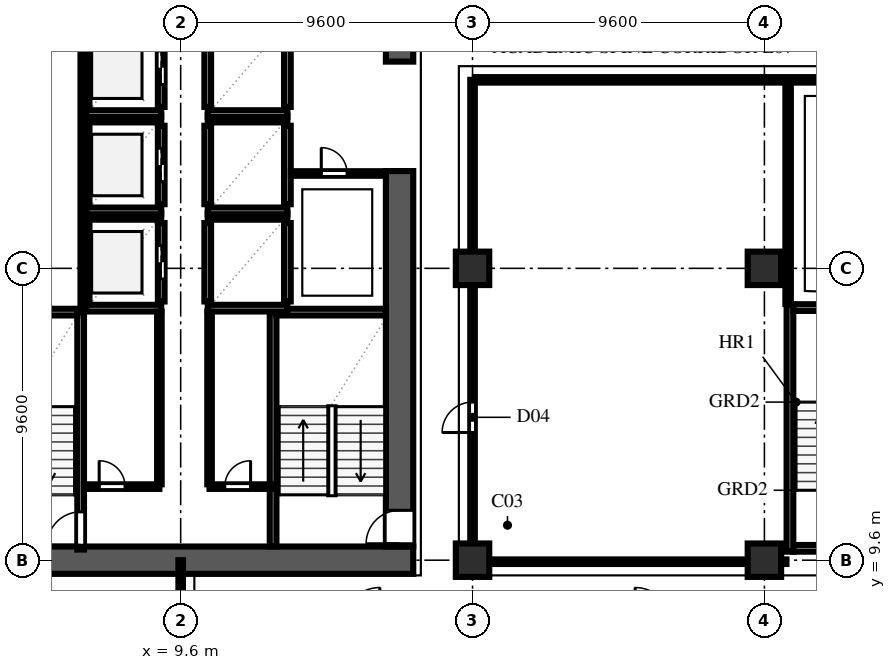
"""IFC4 building model, lengths in metres.
Left out: names, types, materials, properties, quantities, classifications, styles, units other than length and angle.
Written with IfcOpenShell. Run it as: python <this file> out.ifc"""

import sys

from ifc_helpers import new_model, si_unit, direction, frame, frame_2d, origin, origin_2d, place, context, subcontext, project, spatial, rectangle, extrude, element, fill, save


model = new_model("IFC4")
c1 = context("Model", 3, precision=1e-05, world=origin(), true_north=direction((0.0, 1.0)))
c2 = subcontext(c1, "Body", "Model", "MODEL_VIEW")
j1 = project(units=[si_unit("LENGTHUNIT", "METRE"), si_unit("PLANEANGLEUNIT", "RADIAN")], contexts=[c1])
p1 = place(None, origin())
s1 = spatial("IfcSite", under=j1, at=p1, CompositionType="ELEMENT")
p2 = place(p1, origin())
s2 = spatial("IfcBuilding", under=s1, at=p2, CompositionType="ELEMENT")
p3 = place(p2, frame((0.0, 0.0, 31.8)))
s3 = spatial("IfcBuildingStorey", under=s2, at=p3, CompositionType="ELEMENT", Elevation=31.8)
p4 = place(p3, frame((2.65, 9.6, 0.0), z_axis=(0.0, 0.0, 1.0), x_axis=(1.0, 0.0, 0.0)))
e1 = element("IfcWall", 1, at=p4, inside=s3, PredefinedType="SHEAR", context=c2, shape_type="SweptSolid", body=[
    extrude(rectangle(XDim=14.6, YDim=0.9, at=frame_2d((7.3, 0.0))), origin(), (0.0, 0.0, 1.0), 3.54),
])
p5 = place(p3, frame((16.8, 10.05, 0.0), z_axis=(0.0, 0.0, 1.0), x_axis=(0.0, 1.0, 0.0)))
e2 = element("IfcWall", 2, at=p5, inside=s3, PredefinedType="SHEAR", context=c2, shape_type="SweptSolid", body=[
    extrude(rectangle(XDim=12.35, YDim=0.9, at=frame_2d((6.175, 0.0))), origin(), (0.0, 0.0, 1.0), 3.54),
])
p6 = place(p5, frame((0.09, 0.0, 0.0)))
e3 = element("IfcOpeningElement", 3, at=p6, cuts=e2, PredefinedType="OPENING", context=c2, shape_type="SweptSolid", body=[
    extrude(rectangle(XDim=1.1, YDim=2.2, at=frame_2d((0.55, 1.1))), frame((0.0, 0.462, 0.0), z_axis=(0.0, -1.0, 0.0), x_axis=(1.0, 0.0, 0.0)), (0.0, 0.0, 1.0), 0.924),
])
p7 = place(p3, frame((16.8, 26.0, 0.0), z_axis=(0.0, 0.0, 1.0), x_axis=(0.0, 1.0, 0.0)))
e4 = element("IfcWall", 4, at=p7, inside=s3, PredefinedType="SHEAR", context=c2, shape_type="SweptSolid", body=[
    extrude(rectangle(XDim=7.8, YDim=0.9, at=frame_2d((3.9, 0.0))), origin(), (0.0, 0.0, 1.0), 3.54),
])
for number, where, z_axis, x_axis in (
    (5, (19.2, 9.6, 0.0), (0.0, 0.0, 1.0), (1.0, 0.0, 0.0)),
    (6, (19.2, 19.2, 0.0), (0.0, 0.0, 1.0), (1.0, 0.0, 0.0)),
    (7, (28.8, 9.6, 0.0), (0.0, 0.0, 1.0), (1.0, 0.0, 0.0)),
    (8, (28.8, 19.2, 0.0), (0.0, 0.0, 1.0), (1.0, 0.0, 0.0)),
):
    element("IfcColumn", number, at=place(p3, frame(where, z_axis=z_axis, x_axis=x_axis)), inside=s3, PredefinedType="COLUMN", context=c2, shape_type="SweptSolid", body=[
        extrude(rectangle(XDim=1.1, YDim=1.1, at=origin_2d()), origin(), (0.0, 0.0, 1.0), 3.8),
    ])
p8 = place(p3, frame((6.31, 9.95, 0.0), z_axis=(0.0, 0.0, 1.0), x_axis=(0.0, 1.0, 0.0)))
e9 = element("IfcWall", 9, at=p8, inside=s3, PredefinedType="SOLIDWALL", context=c2, shape_type="SweptSolid", body=[
    extrude(rectangle(XDim=7.81, YDim=0.22, at=frame_2d((3.905, 0.0))), origin(), (0.0, 0.0, 1.0), 3.54),
])
p9 = place(p8, frame((0.14, 0.0, 0.0)))
e10 = element("IfcOpeningElement", 10, at=p9, cuts=e9, PredefinedType="OPENING", context=c2, shape_type="SweptSolid", body=[
    extrude(rectangle(XDim=1.1, YDim=2.2, at=frame_2d((0.55, 1.1))), frame((0.0, 0.122, 0.0), z_axis=(0.0, -1.0, 0.0), x_axis=(1.0, 0.0, 0.0)), (0.0, 0.0, 1.0), 0.244),
])
p10 = place(p3, frame((2.65, 17.76, 0.0), z_axis=(0.0, 0.0, 1.0), x_axis=(1.0, 0.0, 0.0)))
e11 = element("IfcWall", 11, at=p10, inside=s3, PredefinedType="SOLIDWALL", context=c2, shape_type="SweptSolid", body=[
    extrude(rectangle(XDim=3.55, YDim=0.22, at=frame_2d((1.775, 0.0))), origin(), (0.0, 0.0, 1.0), 3.54),
])
p11 = place(p3, frame((12.64, 10.05, 0.0), z_axis=(0.0, 0.0, 1.0), x_axis=(0.0, 1.0, 0.0)))
e12 = element("IfcWall", 12, at=p11, inside=s3, PredefinedType="SOLIDWALL", context=c2, shape_type="SweptSolid", body=[
    extrude(rectangle(XDim=7.71, YDim=0.22, at=frame_2d((3.855, 0.0))), origin(), (0.0, 0.0, 1.0), 3.54),
])
p12 = place(p3, frame((12.75, 17.76, 0.0), z_axis=(0.0, 0.0, 1.0), x_axis=(1.0, 0.0, 0.0)))
e13 = element("IfcWall", 13, at=p12, inside=s3, PredefinedType="SOLIDWALL", context=c2, shape_type="SweptSolid", body=[
    extrude(rectangle(XDim=3.6, YDim=0.22, at=frame_2d((1.8, 0.0))), origin(), (0.0, 0.0, 1.0), 3.54),
])
p13 = place(p3, frame((29.75, 9.99, 0.0), z_axis=(0.0, 0.0, 1.0), x_axis=(1.0, 0.0, 0.0)))
e14 = element("IfcWall", 14, at=p13, inside=s3, PredefinedType="SOLIDWALL", context=c2, shape_type="SweptSolid", body=[
    extrude(rectangle(XDim=3.65, YDim=0.22, at=frame_2d((1.825, 0.0))), origin(), (0.0, 0.0, 1.0), 3.54),
])
p14 = place(p13, frame((1.24, 0.0, 0.0)))
e15 = element("IfcOpeningElement", 15, at=p14, cuts=e14, PredefinedType="OPENING", context=c2, shape_type="SweptSolid", body=[
    extrude(rectangle(XDim=1.1, YDim=2.2, at=frame_2d((0.55, 1.1))), frame((0.0, 0.122, 0.0), z_axis=(0.0, -1.0, 0.0), x_axis=(1.0, 0.0, 0.0)), (0.0, 0.0, 1.0), 0.244),
])
p15 = place(p3, frame((29.64, 9.88, 0.0), z_axis=(0.0, 0.0, 1.0), x_axis=(0.0, 1.0, 0.0)))
e16 = element("IfcWall", 16, at=p15, inside=s3, PredefinedType="SOLIDWALL", context=c2, shape_type="SweptSolid", body=[
    extrude(rectangle(XDim=8.14, YDim=0.22, at=frame_2d((4.07, 0.0))), origin(), (0.0, 0.0, 1.0), 3.54),
])
p16 = place(p3, frame((29.75, 17.91, 0.0), z_axis=(0.0, 0.0, 1.0), x_axis=(1.0, 0.0, 0.0)))
e17 = element("IfcWall", 17, at=p16, inside=s3, PredefinedType="SOLIDWALL", context=c2, shape_type="SweptSolid", body=[
    extrude(rectangle(XDim=3.65, YDim=0.22, at=frame_2d((1.825, 0.0))), origin(), (0.0, 0.0, 1.0), 3.54),
])
p17 = place(p3, frame((6.49, 18.11, 0.0), z_axis=(0.0, 0.0, 1.0), x_axis=(0.0, 1.0, 0.0)))
e18 = element("IfcWall", 18, at=p17, inside=s3, PredefinedType="SOLIDWALL", context=c2, shape_type="SweptSolid", body=[
    extrude(rectangle(XDim=2.58, YDim=0.22, at=frame_2d((1.29, 0.0))), origin(), (0.0, 0.0, 1.0), 3.54),
])
p18 = place(p3, frame((8.96, 18.11, 0.0), z_axis=(0.0, 0.0, 1.0), x_axis=(0.0, 1.0, 0.0)))
e19 = element("IfcWall", 19, at=p18, inside=s3, PredefinedType="SOLIDWALL", context=c2, shape_type="SweptSolid", body=[
    extrude(rectangle(XDim=2.58, YDim=0.22, at=frame_2d((1.29, 0.0))), origin(), (0.0, 0.0, 1.0), 3.54),
])
p19 = place(p18, frame((0.74, 0.0, 0.0)))
e20 = element("IfcOpeningElement", 20, at=p19, cuts=e19, PredefinedType="OPENING", context=c2, shape_type="SweptSolid", body=[
    extrude(rectangle(XDim=1.1, YDim=2.2, at=frame_2d((0.55, 1.1))), frame((0.0, 0.122, 0.0), z_axis=(0.0, -1.0, 0.0), x_axis=(1.0, 0.0, 0.0)), (0.0, 0.0, 1.0), 0.244),
])
for number, where, z_axis, x_axis in (
    (21, (6.49, 17.89, 0.0), (0.0, 0.0, 1.0), (1.0, 0.0, 0.0)),
    (22, (6.49, 20.91, 0.0), (0.0, 0.0, 1.0), (1.0, 0.0, 0.0)),
):
    element("IfcWall", number, at=place(p3, frame(where, z_axis=z_axis, x_axis=x_axis)), inside=s3, PredefinedType="SOLIDWALL", context=c2, shape_type="SweptSolid", body=[
        extrude(rectangle(XDim=2.47, YDim=0.22, at=frame_2d((1.235, 0.0))), origin(), (0.0, 0.0, 1.0), 3.54),
    ])
p20 = place(p3, frame((6.49, 21.31, 0.0), z_axis=(0.0, 0.0, 1.0), x_axis=(0.0, 1.0, 0.0)))
e23 = element("IfcWall", 23, at=p20, inside=s3, PredefinedType="SOLIDWALL", context=c2, shape_type="SweptSolid", body=[
    extrude(rectangle(XDim=2.58, YDim=0.22, at=frame_2d((1.29, 0.0))), origin(), (0.0, 0.0, 1.0), 3.54),
])
p21 = place(p3, frame((8.96, 21.31, 0.0), z_axis=(0.0, 0.0, 1.0), x_axis=(0.0, 1.0, 0.0)))
e24 = element("IfcWall", 24, at=p21, inside=s3, PredefinedType="SOLIDWALL", context=c2, shape_type="SweptSolid", body=[
    extrude(rectangle(XDim=2.58, YDim=0.22, at=frame_2d((1.29, 0.0))), origin(), (0.0, 0.0, 1.0), 3.54),
])
p22 = place(p21, frame((0.74, 0.0, 0.0)))
e25 = element("IfcOpeningElement", 25, at=p22, cuts=e24, PredefinedType="OPENING", context=c2, shape_type="SweptSolid", body=[
    extrude(rectangle(XDim=1.1, YDim=2.2, at=frame_2d((0.55, 1.1))), frame((0.0, 0.122, 0.0), z_axis=(0.0, -1.0, 0.0), x_axis=(1.0, 0.0, 0.0)), (0.0, 0.0, 1.0), 0.244),
])
for number, where, z_axis, x_axis in (
    (26, (6.49, 21.09, 0.0), (0.0, 0.0, 1.0), (1.0, 0.0, 0.0)),
    (27, (6.49, 24.11, 0.0), (0.0, 0.0, 1.0), (1.0, 0.0, 0.0)),
):
    element("IfcWall", number, at=place(p3, frame(where, z_axis=z_axis, x_axis=x_axis)), inside=s3, PredefinedType="SOLIDWALL", context=c2, shape_type="SweptSolid", body=[
        extrude(rectangle(XDim=2.47, YDim=0.22, at=frame_2d((1.235, 0.0))), origin(), (0.0, 0.0, 1.0), 3.54),
    ])
p23 = place(p3, frame((6.49, 24.51, 0.0), z_axis=(0.0, 0.0, 1.0), x_axis=(0.0, 1.0, 0.0)))
e28 = element("IfcWall", 28, at=p23, inside=s3, PredefinedType="SOLIDWALL", context=c2, shape_type="SweptSolid", body=[
    extrude(rectangle(XDim=2.58, YDim=0.22, at=frame_2d((1.29, 0.0))), origin(), (0.0, 0.0, 1.0), 3.54),
])
p24 = place(p3, frame((8.96, 24.51, 0.0), z_axis=(0.0, 0.0, 1.0), x_axis=(0.0, 1.0, 0.0)))
e29 = element("IfcWall", 29, at=p24, inside=s3, PredefinedType="SOLIDWALL", context=c2, shape_type="SweptSolid", body=[
    extrude(rectangle(XDim=2.58, YDim=0.22, at=frame_2d((1.29, 0.0))), origin(), (0.0, 0.0, 1.0), 3.54),
])
p25 = place(p24, frame((0.74, 0.0, 0.0)))
e30 = element("IfcOpeningElement", 30, at=p25, cuts=e29, PredefinedType="OPENING", context=c2, shape_type="SweptSolid", body=[
    extrude(rectangle(XDim=1.1, YDim=2.2, at=frame_2d((0.55, 1.1))), frame((0.0, 0.122, 0.0), z_axis=(0.0, -1.0, 0.0), x_axis=(1.0, 0.0, 0.0)), (0.0, 0.0, 1.0), 0.244),
])
p26 = place(p3, frame((6.49, 24.29, 0.0), z_axis=(0.0, 0.0, 1.0), x_axis=(1.0, 0.0, 0.0)))
e31 = element("IfcWall", 31, at=p26, inside=s3, PredefinedType="SOLIDWALL", context=c2, shape_type="SweptSolid", body=[
    extrude(rectangle(XDim=2.47, YDim=0.22, at=frame_2d((1.235, 0.0))), origin(), (0.0, 0.0, 1.0), 3.54),
])
for number, where, z_axis, x_axis in (
    (32, (10.49, 18.11, 0.0), (0.0, 0.0, 1.0), (0.0, 1.0, 0.0)),
    (33, (13.11, 18.11, 0.0), (0.0, 0.0, 1.0), (0.0, 1.0, 0.0)),
):
    element("IfcWall", number, at=place(p3, frame(where, z_axis=z_axis, x_axis=x_axis)), inside=s3, PredefinedType="SOLIDWALL", context=c2, shape_type="SweptSolid", body=[
        extrude(rectangle(XDim=2.58, YDim=0.22, at=frame_2d((1.29, 0.0))), origin(), (0.0, 0.0, 1.0), 3.54),
    ])
for number, where, z_axis, x_axis in (
    (34, (10.49, 17.89, 0.0), (0.0, 0.0, 1.0), (1.0, 0.0, 0.0)),
    (35, (10.49, 20.91, 0.0), (0.0, 0.0, 1.0), (1.0, 0.0, 0.0)),
):
    element("IfcWall", number, at=place(p3, frame(where, z_axis=z_axis, x_axis=x_axis)), inside=s3, PredefinedType="SOLIDWALL", context=c2, shape_type="SweptSolid", body=[
        extrude(rectangle(XDim=2.62, YDim=0.22, at=frame_2d((1.31, 0.0))), origin(), (0.0, 0.0, 1.0), 3.54),
    ])
for number, where, z_axis, x_axis in (
    (36, (10.49, 21.31, 0.0), (0.0, 0.0, 1.0), (0.0, 1.0, 0.0)),
    (37, (13.11, 21.31, 0.0), (0.0, 0.0, 1.0), (0.0, 1.0, 0.0)),
):
    element("IfcWall", number, at=place(p3, frame(where, z_axis=z_axis, x_axis=x_axis)), inside=s3, PredefinedType="SOLIDWALL", context=c2, shape_type="SweptSolid", body=[
        extrude(rectangle(XDim=2.58, YDim=0.22, at=frame_2d((1.29, 0.0))), origin(), (0.0, 0.0, 1.0), 3.54),
    ])
for number, where, z_axis, x_axis in (
    (38, (10.49, 21.09, 0.0), (0.0, 0.0, 1.0), (1.0, 0.0, 0.0)),
    (39, (10.49, 24.11, 0.0), (0.0, 0.0, 1.0), (1.0, 0.0, 0.0)),
):
    element("IfcWall", number, at=place(p3, frame(where, z_axis=z_axis, x_axis=x_axis)), inside=s3, PredefinedType="SOLIDWALL", context=c2, shape_type="SweptSolid", body=[
        extrude(rectangle(XDim=2.62, YDim=0.22, at=frame_2d((1.31, 0.0))), origin(), (0.0, 0.0, 1.0), 3.54),
    ])
for number, where, z_axis, x_axis in (
    (40, (10.49, 24.51, 0.0), (0.0, 0.0, 1.0), (0.0, 1.0, 0.0)),
    (41, (13.11, 24.51, 0.0), (0.0, 0.0, 1.0), (0.0, 1.0, 0.0)),
):
    element("IfcWall", number, at=place(p3, frame(where, z_axis=z_axis, x_axis=x_axis)), inside=s3, PredefinedType="SOLIDWALL", context=c2, shape_type="SweptSolid", body=[
        extrude(rectangle(XDim=2.58, YDim=0.22, at=frame_2d((1.29, 0.0))), origin(), (0.0, 0.0, 1.0), 3.54),
    ])
p27 = place(p3, frame((10.49, 24.29, 0.0), z_axis=(0.0, 0.0, 1.0), x_axis=(1.0, 0.0, 0.0)))
e42 = element("IfcWall", 42, at=p27, inside=s3, PredefinedType="SOLIDWALL", context=c2, shape_type="SweptSolid", body=[
    extrude(rectangle(XDim=2.62, YDim=0.22, at=frame_2d((1.31, 0.0))), origin(), (0.0, 0.0, 1.0), 3.54),
])
p28 = place(p3, frame((6.42, 12.02, 0.0), z_axis=(0.0, 0.0, 1.0), x_axis=(1.0, 0.0, 0.0)))
e43 = element("IfcWall", 43, at=p28, inside=s3, PredefinedType="PARTITIONING", context=c2, shape_type="SweptSolid", body=[
    extrude(rectangle(XDim=2.48, YDim=0.15, at=frame_2d((1.24, 0.0))), origin(), (0.0, 0.0, 1.0), 3.54),
])
p29 = place(p28, frame((0.5, 0.0, 0.0)))
e44 = element("IfcOpeningElement", 44, at=p29, cuts=e43, PredefinedType="OPENING", context=c2, shape_type="SweptSolid", body=[
    extrude(rectangle(XDim=0.85, YDim=2.1, at=frame_2d((0.425, 1.05))), frame((0.0, 0.087, 0.0), z_axis=(0.0, -1.0, 0.0), x_axis=(1.0, 0.0, 0.0)), (0.0, 0.0, 1.0), 0.174),
])
p30 = place(p3, frame((10.55, 12.02, 0.0), z_axis=(0.0, 0.0, 1.0), x_axis=(1.0, 0.0, 0.0)))
e45 = element("IfcWall", 45, at=p30, inside=s3, PredefinedType="PARTITIONING", context=c2, shape_type="SweptSolid", body=[
    extrude(rectangle(XDim=2.08, YDim=0.15, at=frame_2d((1.04, 0.0))), origin(), (0.0, 0.0, 1.0), 3.54),
])
p31 = place(p30, frame((0.5, 0.0, 0.0)))
e46 = element("IfcOpeningElement", 46, at=p31, cuts=e45, PredefinedType="OPENING", context=c2, shape_type="SweptSolid", body=[
    extrude(rectangle(XDim=0.85, YDim=2.1, at=frame_2d((0.425, 1.05))), frame((0.0, 0.087, 0.0), z_axis=(0.0, -1.0, 0.0), x_axis=(1.0, 0.0, 0.0)), (0.0, 0.0, 1.0), 0.174),
])
for number, where, z_axis, x_axis in (
    (47, (8.9, 12.095, 0.0), (0.0, 0.0, 1.0), (0.0, 1.0, 0.0)),
    (48, (10.55, 12.095, 0.0), (0.0, 0.0, 1.0), (0.0, 1.0, 0.0)),
):
    element("IfcWall", number, at=place(p3, frame(where, z_axis=z_axis, x_axis=x_axis)), inside=s3, PredefinedType="PARTITIONING", context=c2, shape_type="SweptSolid", body=[
        extrude(rectangle(XDim=5.68, YDim=0.15, at=frame_2d((2.84, 0.0))), origin(), (0.0, 0.0, 1.0), 3.54),
    ])
p32 = place(p3, frame((13.225, 22.32, 0.0), z_axis=(0.0, 0.0, 1.0), x_axis=(1.0, 0.0, 0.0)))
e49 = element("IfcWall", 49, at=p32, inside=s3, PredefinedType="PARTITIONING", context=c2, shape_type="SweptSolid", body=[
    extrude(rectangle(XDim=3.12, YDim=0.15, at=frame_2d((1.56, 0.0))), origin(), (0.0, 0.0, 1.0), 3.54),
])
p33 = place(p32, frame((1.0, 0.0, 0.0)))
e50 = element("IfcOpeningElement", 50, at=p33, cuts=e49, PredefinedType="OPENING", context=c2, shape_type="SweptSolid", body=[
    extrude(rectangle(XDim=0.85, YDim=2.1, at=frame_2d((0.425, 1.05))), frame((0.0, 0.087, 0.0), z_axis=(0.0, -1.0, 0.0), x_axis=(1.0, 0.0, 0.0)), (0.0, 0.0, 1.0), 0.174),
])
p34 = place(p3, frame((6.38, 17.8, 0.0), z_axis=(0.0, 0.0, 1.0), x_axis=(0.0, 1.0, 0.0)))
e51 = element("IfcWall", 51, at=p34, inside=s3, PredefinedType="PARTITIONING", context=c2, shape_type="SweptSolid", body=[
    extrude(rectangle(XDim=18.98, YDim=0.15, at=frame_2d((9.49, 0.0))), origin(), (0.0, 0.0, 1.0), 3.54),
])
p35 = place(p34, frame((14.3, 0.0, 0.0)))
e52 = element("IfcOpeningElement", 52, at=p35, cuts=e51, PredefinedType="OPENING", context=c2, shape_type="SweptSolid", body=[
    extrude(rectangle(XDim=0.85, YDim=2.1, at=frame_2d((0.425, 1.05))), frame((0.0, 0.087, 0.0), z_axis=(0.0, -1.0, 0.0), x_axis=(1.0, 0.0, 0.0)), (0.0, 0.0, 1.0), 0.174),
])
p36 = place(p3, frame((9.6, 7.5, 0.0), z_axis=(0.0, 0.0, 1.0), x_axis=(0.0, 1.0, 0.0)))
e53 = element("IfcWall", 53, at=p36, inside=s3, PredefinedType="PARTITIONING", context=c2, shape_type="SweptSolid", body=[
    extrude(rectangle(XDim=2.1, YDim=0.15, at=frame_2d((1.05, 0.0))), origin(), (0.0, 0.0, 1.0), 2.923),
])
p37 = place(p3, frame((19.2, 9.55, 0.0), z_axis=(0.0, 0.0, 1.0), x_axis=(0.0, 1.0, 0.0)))
e54 = element("IfcWall", 54, at=p37, inside=s3, PredefinedType="PARTITIONING", context=c2, shape_type="SweptSolid", body=[
    extrude(rectangle(XDim=15.85, YDim=0.15, at=frame_2d((7.925, 0.0))), origin(), (0.0, 0.0, 1.0), 2.923),
])
p38 = place(p37, frame((4.25, 0.0, 0.0)))
e55 = element("IfcOpeningElement", 55, at=p38, cuts=e54, PredefinedType="OPENING", context=c2, shape_type="SweptSolid", body=[
    extrude(rectangle(XDim=1.0, YDim=2.2, at=frame_2d((0.5, 1.1))), frame((0.0, 0.087, 0.0), z_axis=(0.0, -1.0, 0.0), x_axis=(1.0, 0.0, 0.0)), (0.0, 0.0, 1.0), 0.174),
])
p39 = place(p3, frame((29.58, 18.025, 0.0), z_axis=(0.0, 0.0, 1.0), x_axis=(0.0, 1.0, 0.0)))
e56 = element("IfcWall", 56, at=p39, inside=s3, PredefinedType="PARTITIONING", context=c2, shape_type="SweptSolid", body=[
    extrude(rectangle(XDim=7.28, YDim=0.18, at=frame_2d((3.64, 0.0))), origin(), (0.0, 0.0, 1.0), 3.54),
])
p40 = place(p3, frame((19.28, 25.4, 0.0), z_axis=(0.0, 0.0, 1.0), x_axis=(1.0, 0.0, 0.0)))
e57 = element("IfcWall", 57, at=p40, inside=s3, PredefinedType="PARTITIONING", context=c2, shape_type="SweptSolid", body=[
    extrude(rectangle(XDim=35.695, YDim=0.18, at=frame_2d((17.848, 0.0))), origin(), (0.0, 0.0, 1.0), 3.54),
])
p41 = place(p40, frame((22.457, 0.0, 0.0)))
e58 = element("IfcOpeningElement", 58, at=p41, cuts=e57, PredefinedType="OPENING", context=c2, shape_type="SweptSolid", body=[
    extrude(rectangle(XDim=1.2, YDim=2.2, at=frame_2d((0.6, 1.1))), frame((0.0, 0.102, 0.0), z_axis=(0.0, -1.0, 0.0), x_axis=(1.0, 0.0, 0.0)), (0.0, 0.0, 1.0), 0.204),
])
p42 = place(p3, frame((19.28, 9.55, 0.0), z_axis=(0.0, 0.0, 1.0), x_axis=(1.0, 0.0, 0.0)))
e59 = element("IfcWall", 59, at=p42, inside=s3, PredefinedType="PARTITIONING", context=c2, shape_type="SweptSolid", body=[
    extrude(rectangle(XDim=10.245, YDim=0.15, at=frame_2d((5.123, 0.0))), origin(), (0.0, 0.0, 1.0), 2.923),
])
p43 = place(p9, origin())
e60 = element("IfcDoor", 60, at=p43, inside=s3, OperationType="SINGLE_SWING_LEFT", PredefinedType="DOOR", context=c2, shape_type="SweptSolid", body=[
    extrude(rectangle(XDim=1.1, YDim=2.2, at=frame_2d((0.55, 1.1))), frame((0.0, 0.025, 0.0), z_axis=(0.0, -1.0, 0.0), x_axis=(1.0, 0.0, 0.0)), (0.0, 0.0, 1.0), 0.05),
])
fill(e10, e60)
p44 = place(p6, origin())
e61 = element("IfcDoor", 61, at=p44, inside=s3, OperationType="SINGLE_SWING_LEFT", PredefinedType="DOOR", context=c2, shape_type="SweptSolid", body=[
    extrude(rectangle(XDim=1.1, YDim=2.2, at=frame_2d((0.55, 1.1))), frame((0.0, 0.025, 0.0), z_axis=(0.0, -1.0, 0.0), x_axis=(1.0, 0.0, 0.0)), (0.0, 0.0, 1.0), 0.05),
])
fill(e3, e61)
p45 = place(p19, origin())
e62 = element("IfcDoor", 62, at=p45, inside=s3, OperationType="DOUBLE_DOOR_SLIDING", PredefinedType="DOOR", context=c2, shape_type="SweptSolid", body=[
    extrude(rectangle(XDim=1.1, YDim=2.2, at=frame_2d((0.55, 1.1))), frame((0.0, 0.025, 0.0), z_axis=(0.0, -1.0, 0.0), x_axis=(1.0, 0.0, 0.0)), (0.0, 0.0, 1.0), 0.05),
])
fill(e20, e62)
p46 = place(p22, origin())
e63 = element("IfcDoor", 63, at=p46, inside=s3, OperationType="DOUBLE_DOOR_SLIDING", PredefinedType="DOOR", context=c2, shape_type="SweptSolid", body=[
    extrude(rectangle(XDim=1.1, YDim=2.2, at=frame_2d((0.55, 1.1))), frame((0.0, 0.025, 0.0), z_axis=(0.0, -1.0, 0.0), x_axis=(1.0, 0.0, 0.0)), (0.0, 0.0, 1.0), 0.05),
])
fill(e25, e63)
p47 = place(p25, origin())
e64 = element("IfcDoor", 64, at=p47, inside=s3, OperationType="DOUBLE_DOOR_SLIDING", PredefinedType="DOOR", context=c2, shape_type="SweptSolid", body=[
    extrude(rectangle(XDim=1.1, YDim=2.2, at=frame_2d((0.55, 1.1))), frame((0.0, 0.025, 0.0), z_axis=(0.0, -1.0, 0.0), x_axis=(1.0, 0.0, 0.0)), (0.0, 0.0, 1.0), 0.05),
])
fill(e30, e64)
p48 = place(p29, origin())
e65 = element("IfcDoor", 65, at=p48, inside=s3, OperationType="SINGLE_SWING_LEFT", PredefinedType="DOOR", context=c2, shape_type="SweptSolid", body=[
    extrude(rectangle(XDim=0.85, YDim=2.1, at=frame_2d((0.425, 1.05))), frame((0.0, 0.025, 0.0), z_axis=(0.0, -1.0, 0.0), x_axis=(1.0, 0.0, 0.0)), (0.0, 0.0, 1.0), 0.05),
])
fill(e44, e65)
p49 = place(p31, origin())
e66 = element("IfcDoor", 66, at=p49, inside=s3, OperationType="SINGLE_SWING_RIGHT", PredefinedType="DOOR", context=c2, shape_type="SweptSolid", body=[
    extrude(rectangle(XDim=0.85, YDim=2.1, at=frame_2d((0.425, 1.05))), frame((0.0, 0.025, 0.0), z_axis=(0.0, -1.0, 0.0), x_axis=(1.0, 0.0, 0.0)), (0.0, 0.0, 1.0), 0.05),
])
fill(e46, e66)
p50 = place(p33, origin())
e67 = element("IfcDoor", 67, at=p50, inside=s3, OperationType="SINGLE_SWING_LEFT", PredefinedType="DOOR", context=c2, shape_type="SweptSolid", body=[
    extrude(rectangle(XDim=0.85, YDim=2.1, at=frame_2d((0.425, 1.05))), frame((0.0, 0.025, 0.0), z_axis=(0.0, -1.0, 0.0), x_axis=(1.0, 0.0, 0.0)), (0.0, 0.0, 1.0), 0.05),
])
fill(e50, e67)
p51 = place(p38, origin())
e68 = element("IfcDoor", 68, at=p51, inside=s3, OperationType="SINGLE_SWING_LEFT", PredefinedType="DOOR", context=c2, shape_type="SweptSolid", body=[
    extrude(rectangle(XDim=1.0, YDim=2.2, at=frame_2d((0.5, 1.1))), frame((0.0, 0.025, 0.0), z_axis=(0.0, -1.0, 0.0), x_axis=(1.0, 0.0, 0.0)), (0.0, 0.0, 1.0), 0.05),
])
fill(e55, e68)
save(model, sys.argv[1])
